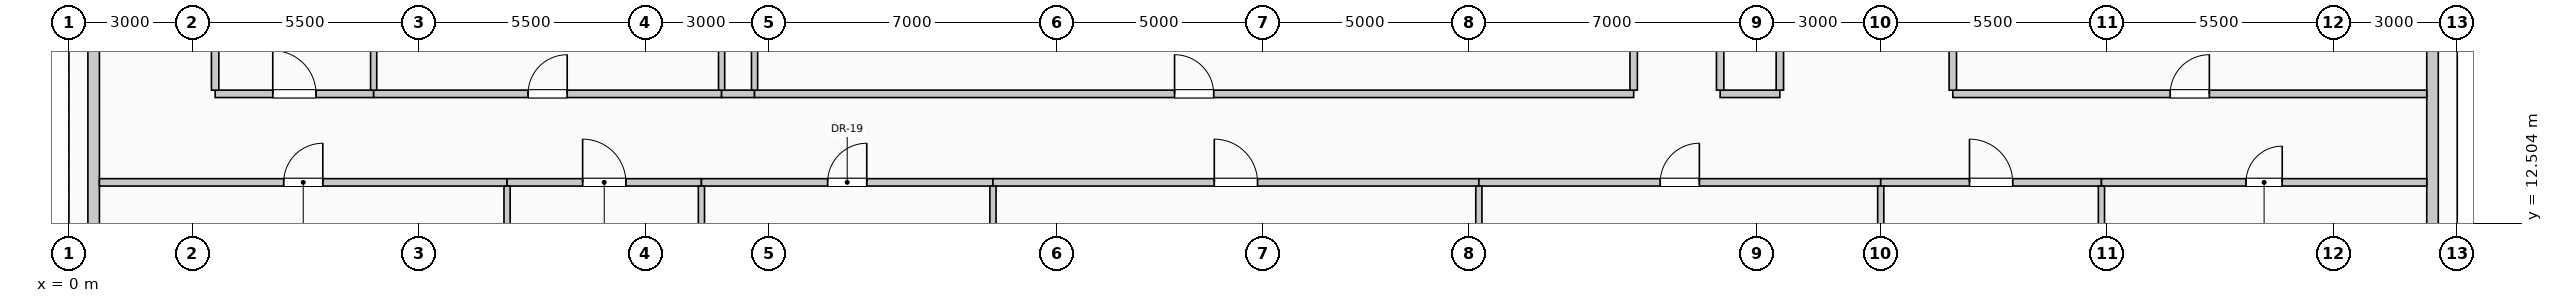
"""IFC4 building model, lengths in metres.
Left out: names, types, materials, properties, quantities, classifications, styles, units other than length and angle.
Written with IfcOpenShell. Run it as: python <this file> out.ifc"""

import sys

from ifc_helpers import new_model, si_unit, direction, frame, frame_2d, origin, place, context, subcontext, project, spatial, rectangle, extrude, element, fill, save


model = new_model("IFC4")
c1 = context("Model", 3, precision=1e-05, world=origin(), true_north=direction((0.0, 1.0)))
c2 = subcontext(c1, "Body", "Model", "MODEL_VIEW")
j1 = project(units=[si_unit("LENGTHUNIT", "METRE"), si_unit("PLANEANGLEUNIT", "RADIAN")], contexts=[c1])
p1 = place(None, origin())
s1 = spatial("IfcSite", under=j1, at=p1, CompositionType="ELEMENT")
p2 = place(p1, origin())
s2 = spatial("IfcBuilding", under=s1, at=p2, CompositionType="ELEMENT")
p3 = place(p2, frame((0.0, 0.0, 124.6)))
s3 = spatial("IfcBuildingStorey", under=s2, at=p3, CompositionType="ELEMENT", Elevation=124.6)
for number, where, z_axis, x_axis in (
    (1, (0.6, 10.445, 0.0), (0.0, 0.0, 1.0), (0.0, 1.0, 0.0)),
    (2, (57.4, 17.555, 0.0), (0.0, 0.0, 1.0), (0.0, -1.0, 0.0)),
):
    element("IfcWall", number, at=place(p3, frame(where, z_axis=z_axis, x_axis=x_axis)), inside=s3, PredefinedType="SOLIDWALL", context=c2, shape_type="SweptSolid", body=[
        extrude(rectangle(XDim=7.11, YDim=0.28, at=frame_2d((3.555, 0.0))), origin(), (0.0, 0.0, 1.0), 2.875),
    ])
p4 = place(p3, frame((0.74, 13.5, 0.0), z_axis=(0.0, 0.0, 1.0), x_axis=(1.0, 0.0, 0.0)))
e3 = element("IfcWall", 3, at=p4, inside=s3, PredefinedType="PARTITIONING", context=c2, shape_type="SweptSolid", body=[
    extrude(rectangle(XDim=9.9, YDim=0.18, at=frame_2d((4.95, 0.0))), origin(), (0.0, 0.0, 1.0), 3.725),
])
p5 = place(p4, frame((4.475, 0.0, 0.0)))
e4 = element("IfcOpeningElement", 4, at=p5, cuts=e3, PredefinedType="OPENING", context=c2, shape_type="SweptSolid", body=[
    extrude(rectangle(XDim=0.95, YDim=2.15, at=frame_2d((0.475, 1.075))), frame((0.0, 0.1, 0.0), z_axis=(0.0, -1.0, 0.0), x_axis=(1.0, 0.0, 0.0)), (0.0, 0.0, 1.0), 0.2),
])
p6 = place(p3, frame((10.64, 13.5, 0.0), z_axis=(0.0, 0.0, 1.0), x_axis=(1.0, 0.0, 0.0)))
e5 = element("IfcWall", 5, at=p6, inside=s3, PredefinedType="PARTITIONING", context=c2, shape_type="SweptSolid", body=[
    extrude(rectangle(XDim=4.72, YDim=0.18, at=frame_2d((2.36, 0.0))), origin(), (0.0, 0.0, 1.0), 3.725),
])
p7 = place(p6, frame((1.835, 0.0, 0.0)))
e6 = element("IfcOpeningElement", 6, at=p7, cuts=e5, PredefinedType="OPENING", context=c2, shape_type="SweptSolid", body=[
    extrude(rectangle(XDim=1.05, YDim=2.15, at=frame_2d((0.525, 1.075))), frame((0.0, 0.1, 0.0), z_axis=(0.0, -1.0, 0.0), x_axis=(1.0, 0.0, 0.0)), (0.0, 0.0, 1.0), 0.2),
])
p8 = place(p3, frame((15.36, 13.5, 0.0), z_axis=(0.0, 0.0, 1.0), x_axis=(1.0, 0.0, 0.0)))
e7 = element("IfcWall", 7, at=p8, inside=s3, PredefinedType="PARTITIONING", context=c2, shape_type="SweptSolid", body=[
    extrude(rectangle(XDim=7.08, YDim=0.18, at=frame_2d((3.54, 0.0))), origin(), (0.0, 0.0, 1.0), 3.725),
])
p9 = place(p8, frame((3.065, 0.0, 0.0)))
e8 = element("IfcOpeningElement", 8, at=p9, cuts=e7, PredefinedType="OPENING", context=c2, shape_type="SweptSolid", body=[
    extrude(rectangle(XDim=0.95, YDim=2.15, at=frame_2d((0.475, 1.075))), frame((0.0, 0.1, 0.0), z_axis=(0.0, -1.0, 0.0), x_axis=(1.0, 0.0, 0.0)), (0.0, 0.0, 1.0), 0.2),
])
p10 = place(p3, frame((22.44, 13.5, 0.0), z_axis=(0.0, 0.0, 1.0), x_axis=(1.0, 0.0, 0.0)))
e9 = element("IfcWall", 9, at=p10, inside=s3, PredefinedType="PARTITIONING", context=c2, shape_type="SweptSolid", body=[
    extrude(rectangle(XDim=11.8, YDim=0.18, at=frame_2d((5.9, 0.0))), origin(), (0.0, 0.0, 1.0), 3.725),
])
p11 = place(p10, frame((5.375, 0.0, 0.0)))
e10 = element("IfcOpeningElement", 10, at=p11, cuts=e9, PredefinedType="OPENING", context=c2, shape_type="SweptSolid", body=[
    extrude(rectangle(XDim=1.05, YDim=2.15, at=frame_2d((0.525, 1.075))), frame((0.0, 0.1, 0.0), z_axis=(0.0, -1.0, 0.0), x_axis=(1.0, 0.0, 0.0)), (0.0, 0.0, 1.0), 0.2),
])
p12 = place(p3, frame((34.24, 13.5, 0.0), z_axis=(0.0, 0.0, 1.0), x_axis=(1.0, 0.0, 0.0)))
e11 = element("IfcWall", 11, at=p12, inside=s3, PredefinedType="PARTITIONING", context=c2, shape_type="SweptSolid", body=[
    extrude(rectangle(XDim=9.76, YDim=0.18, at=frame_2d((4.88, 0.0))), origin(), (0.0, 0.0, 1.0), 3.725),
])
p13 = place(p12, frame((4.405, 0.0, 0.0)))
e12 = element("IfcOpeningElement", 12, at=p13, cuts=e11, PredefinedType="OPENING", context=c2, shape_type="SweptSolid", body=[
    extrude(rectangle(XDim=0.95, YDim=2.15, at=frame_2d((0.475, 1.075))), frame((0.0, 0.1, 0.0), z_axis=(0.0, -1.0, 0.0), x_axis=(1.0, 0.0, 0.0)), (0.0, 0.0, 1.0), 0.2),
])
p14 = place(p3, frame((44.0, 13.5, 0.0), z_axis=(0.0, 0.0, 1.0), x_axis=(1.0, 0.0, 0.0)))
e13 = element("IfcWall", 13, at=p14, inside=s3, PredefinedType="PARTITIONING", context=c2, shape_type="SweptSolid", body=[
    extrude(rectangle(XDim=5.36, YDim=0.18, at=frame_2d((2.68, 0.0))), origin(), (0.0, 0.0, 1.0), 3.725),
])
p15 = place(p14, frame((2.155, 0.0, 0.0)))
e14 = element("IfcOpeningElement", 14, at=p15, cuts=e13, PredefinedType="OPENING", context=c2, shape_type="SweptSolid", body=[
    extrude(rectangle(XDim=1.05, YDim=2.15, at=frame_2d((0.525, 1.075))), frame((0.0, 0.1, 0.0), z_axis=(0.0, -1.0, 0.0), x_axis=(1.0, 0.0, 0.0)), (0.0, 0.0, 1.0), 0.2),
])
p16 = place(p3, frame((49.36, 13.5, 0.0), z_axis=(0.0, 0.0, 1.0), x_axis=(1.0, 0.0, 0.0)))
e15 = element("IfcWall", 15, at=p16, inside=s3, PredefinedType="PARTITIONING", context=c2, shape_type="SweptSolid", body=[
    extrude(rectangle(XDim=7.9, YDim=0.18, at=frame_2d((3.95, 0.0))), origin(), (0.0, 0.0, 1.0), 3.725),
])
p17 = place(p16, frame((3.51, 0.0, 0.0)))
e16 = element("IfcOpeningElement", 16, at=p17, cuts=e15, PredefinedType="OPENING", context=c2, shape_type="SweptSolid", body=[
    extrude(rectangle(XDim=0.88, YDim=2.1, at=frame_2d((0.44, 1.05))), frame((0.0, 0.1, 0.0), z_axis=(0.0, -1.0, 0.0), x_axis=(1.0, 0.0, 0.0)), (0.0, 0.0, 1.0), 0.2),
])
p18 = place(p3, frame((3.55, 15.65, 0.0), z_axis=(0.0, 0.0, 1.0), x_axis=(1.0, 0.0, 0.0)))
e17 = element("IfcWall", 17, at=p18, inside=s3, PredefinedType="PARTITIONING", context=c2, shape_type="SweptSolid", body=[
    extrude(rectangle(XDim=3.85, YDim=0.18, at=frame_2d((1.925, 0.0))), origin(), (0.0, 0.0, 1.0), 3.725),
])
p19 = place(p18, frame((1.4, 0.0, 0.0)))
e18 = element("IfcOpeningElement", 18, at=p19, cuts=e17, PredefinedType="OPENING", context=c2, shape_type="SweptSolid", body=[
    extrude(rectangle(XDim=1.05, YDim=2.15, at=frame_2d((0.525, 1.075))), frame((0.0, 0.1, 0.0), z_axis=(0.0, -1.0, 0.0), x_axis=(1.0, 0.0, 0.0)), (0.0, 0.0, 1.0), 0.2),
])
p20 = place(p3, frame((7.4, 15.65, 0.0), z_axis=(0.0, 0.0, 1.0), x_axis=(1.0, 0.0, 0.0)))
e19 = element("IfcWall", 19, at=p20, inside=s3, PredefinedType="PARTITIONING", context=c2, shape_type="SweptSolid", body=[
    extrude(rectangle(XDim=8.45, YDim=0.18, at=frame_2d((4.225, 0.0))), origin(), (0.0, 0.0, 1.0), 3.725),
])
p21 = place(p20, frame((3.75, 0.0, 0.0)))
e20 = element("IfcOpeningElement", 20, at=p21, cuts=e19, PredefinedType="OPENING", context=c2, shape_type="SweptSolid", body=[
    extrude(rectangle(XDim=0.95, YDim=2.15, at=frame_2d((0.475, 1.075))), frame((0.0, 0.1, 0.0), z_axis=(0.0, -1.0, 0.0), x_axis=(1.0, 0.0, 0.0)), (0.0, 0.0, 1.0), 0.2),
])
p22 = place(p3, frame((15.85, 15.65, 0.0), z_axis=(0.0, 0.0, 1.0), x_axis=(1.0, 0.0, 0.0)))
e21 = element("IfcWall", 21, at=p22, inside=s3, PredefinedType="PARTITIONING", context=c2, shape_type="SweptSolid", body=[
    extrude(rectangle(XDim=0.8, YDim=0.18, at=frame_2d((0.4, 0.0))), origin(), (0.0, 0.0, 1.0), 3.725),
])
p23 = place(p3, frame((16.65, 15.65, 0.0), z_axis=(0.0, 0.0, 1.0), x_axis=(1.0, 0.0, 0.0)))
e22 = element("IfcWall", 22, at=p23, inside=s3, PredefinedType="PARTITIONING", context=c2, shape_type="SweptSolid", body=[
    extrude(rectangle(XDim=21.35, YDim=0.18, at=frame_2d((10.675, 0.0))), origin(), (0.0, 0.0, 1.0), 3.725),
])
p24 = place(p23, frame((10.2, 0.0, 0.0)))
e23 = element("IfcOpeningElement", 23, at=p24, cuts=e22, PredefinedType="OPENING", context=c2, shape_type="SweptSolid", body=[
    extrude(rectangle(XDim=0.95, YDim=2.15, at=frame_2d((0.475, 1.075))), frame((0.0, 0.1, 0.0), z_axis=(0.0, -1.0, 0.0), x_axis=(1.0, 0.0, 0.0)), (0.0, 0.0, 1.0), 0.2),
])
p25 = place(p3, frame((40.1, 15.65, 0.0), z_axis=(0.0, 0.0, 1.0), x_axis=(1.0, 0.0, 0.0)))
e24 = element("IfcWall", 24, at=p25, inside=s3, PredefinedType="PARTITIONING", context=c2, shape_type="SweptSolid", body=[
    extrude(rectangle(XDim=1.45, YDim=0.18, at=frame_2d((0.725, 0.0))), origin(), (0.0, 0.0, 1.0), 3.725),
])
p26 = place(p3, frame((45.75, 15.65, 0.0), z_axis=(0.0, 0.0, 1.0), x_axis=(1.0, 0.0, 0.0)))
e25 = element("IfcWall", 25, at=p26, inside=s3, PredefinedType="PARTITIONING", context=c2, shape_type="SweptSolid", body=[
    extrude(rectangle(XDim=11.51, YDim=0.18, at=frame_2d((5.755, 0.0))), origin(), (0.0, 0.0, 1.0), 3.725),
])
p27 = place(p26, frame((5.28, 0.0, 0.0)))
e26 = element("IfcOpeningElement", 26, at=p27, cuts=e25, PredefinedType="OPENING", context=c2, shape_type="SweptSolid", body=[
    extrude(rectangle(XDim=0.95, YDim=2.15, at=frame_2d((0.475, 1.075))), frame((0.0, 0.1, 0.0), z_axis=(0.0, -1.0, 0.0), x_axis=(1.0, 0.0, 0.0)), (0.0, 0.0, 1.0), 0.2),
])
p28 = place(p3, frame((3.55, 15.74, 0.0), z_axis=(0.0, 0.0, 1.0), x_axis=(0.0, 1.0, 0.0)))
e27 = element("IfcWall", 27, at=p28, inside=s3, PredefinedType="PARTITIONING", context=c2, shape_type="SweptSolid", body=[
    extrude(rectangle(XDim=3.135, YDim=0.18, at=frame_2d((1.567, 0.0))), origin(), (0.0, 0.0, 1.0), 3.725),
])
p29 = place(p3, frame((7.4, 15.74, 0.0), z_axis=(0.0, 0.0, 1.0), x_axis=(0.0, 1.0, 0.0)))
e28 = element("IfcWall", 28, at=p29, inside=s3, PredefinedType="PARTITIONING", context=c2, shape_type="SweptSolid", body=[
    extrude(rectangle(XDim=3.135, YDim=0.15, at=frame_2d((1.567, 0.0))), origin(), (0.0, 0.0, 1.0), 3.725),
])
for number, where, z_axis, x_axis in (
    (29, (10.64, 0.74, 0.0), (0.0, 0.0, 1.0), (0.0, 1.0, 0.0)),
    (30, (15.36, 0.74, 0.0), (0.0, 0.0, 1.0), (0.0, 1.0, 0.0)),
):
    element("IfcWall", number, at=place(p3, frame(where, z_axis=z_axis, x_axis=x_axis)), inside=s3, PredefinedType="PARTITIONING", context=c2, shape_type="SweptSolid", body=[
        extrude(rectangle(XDim=12.67, YDim=0.15, at=frame_2d((6.335, 0.0))), origin(), (0.0, 0.0, 1.0), 3.725),
    ])
p30 = place(p3, frame((15.85, 15.74, 0.0), z_axis=(0.0, 0.0, 1.0), x_axis=(0.0, 1.0, 0.0)))
e31 = element("IfcWall", 31, at=p30, inside=s3, PredefinedType="PARTITIONING", context=c2, shape_type="SweptSolid", body=[
    extrude(rectangle(XDim=1.76, YDim=0.15, at=frame_2d((0.88, 0.0))), origin(), (0.0, 0.0, 1.0), 3.725),
])
p31 = place(p3, frame((16.65, 15.74, 0.0), z_axis=(0.0, 0.0, 1.0), x_axis=(0.0, 1.0, 0.0)))
e32 = element("IfcWall", 32, at=p31, inside=s3, PredefinedType="PARTITIONING", context=c2, shape_type="SweptSolid", body=[
    extrude(rectangle(XDim=1.76, YDim=0.15, at=frame_2d((0.88, 0.0))), origin(), (0.0, 0.0, 1.0), 3.07),
])
p32 = place(p3, frame((22.44, 0.74, 0.0), z_axis=(0.0, 0.0, 1.0), x_axis=(0.0, 1.0, 0.0)))
e33 = element("IfcWall", 33, at=p32, inside=s3, PredefinedType="PARTITIONING", context=c2, shape_type="SweptSolid", body=[
    extrude(rectangle(XDim=12.67, YDim=0.15, at=frame_2d((6.335, 0.0))), origin(), (0.0, 0.0, 1.0), 3.725),
])
p33 = place(p3, frame((34.24, 1.3, 0.0), z_axis=(0.0, 0.0, 1.0), x_axis=(0.0, 1.0, 0.0)))
e34 = element("IfcWall", 34, at=p33, inside=s3, PredefinedType="PARTITIONING", context=c2, shape_type="SweptSolid", body=[
    extrude(rectangle(XDim=12.11, YDim=0.15, at=frame_2d((6.055, 0.0))), origin(), (0.0, 0.0, 1.0), 3.725),
])
p34 = place(p3, frame((38.0, 15.74, 0.0), z_axis=(0.0, 0.0, 1.0), x_axis=(0.0, 1.0, 0.0)))
e35 = element("IfcWall", 35, at=p34, inside=s3, PredefinedType="PARTITIONING", context=c2, shape_type="SweptSolid", body=[
    extrude(rectangle(XDim=10.785, YDim=0.18, at=frame_2d((5.393, 0.0))), origin(), (0.0, 0.0, 1.0), 3.725),
])
p35 = place(p3, frame((40.1, 15.74, 0.0), z_axis=(0.0, 0.0, 1.0), x_axis=(0.0, 1.0, 0.0)))
e36 = element("IfcWall", 36, at=p35, inside=s3, PredefinedType="PARTITIONING", context=c2, shape_type="SweptSolid", body=[
    extrude(rectangle(XDim=12.77, YDim=0.18, at=frame_2d((6.385, 0.0))), origin(), (0.0, 0.0, 1.0), 3.725),
])
p36 = place(p3, frame((41.55, 15.74, 0.0), z_axis=(0.0, 0.0, 1.0), x_axis=(0.0, 1.0, 0.0)))
e37 = element("IfcWall", 37, at=p36, inside=s3, PredefinedType="PARTITIONING", context=c2, shape_type="SweptSolid", body=[
    extrude(rectangle(XDim=1.76, YDim=0.18, at=frame_2d((0.88, 0.0))), origin(), (0.0, 0.0, 1.0), 3.07),
])
p37 = place(p3, frame((44.0, 1.175, 0.0), z_axis=(0.0, 0.0, 1.0), x_axis=(0.0, 1.0, 0.0)))
e38 = element("IfcWall", 38, at=p37, inside=s3, PredefinedType="PARTITIONING", context=c2, shape_type="SweptSolid", body=[
    extrude(rectangle(XDim=12.235, YDim=0.15, at=frame_2d((6.117, 0.0))), origin(), (0.0, 0.0, 1.0), 3.725),
])
p38 = place(p3, frame((45.75, 15.74, 0.0), z_axis=(0.0, 0.0, 1.0), x_axis=(0.0, 1.0, 0.0)))
e39 = element("IfcWall", 39, at=p38, inside=s3, PredefinedType="PARTITIONING", context=c2, shape_type="SweptSolid", body=[
    extrude(rectangle(XDim=8.185, YDim=0.18, at=frame_2d((4.093, 0.0))), origin(), (0.0, 0.0, 1.0), 3.725),
])
p39 = place(p3, frame((49.36, 1.175, 0.0), z_axis=(0.0, 0.0, 1.0), x_axis=(0.0, 1.0, 0.0)))
e40 = element("IfcWall", 40, at=p39, inside=s3, PredefinedType="PARTITIONING", context=c2, shape_type="SweptSolid", body=[
    extrude(rectangle(XDim=12.235, YDim=0.15, at=frame_2d((6.117, 0.0))), origin(), (0.0, 0.0, 1.0), 3.725),
])
p40 = place(p5, origin())
e41 = element("IfcDoor", 41, at=p40, inside=s3, OperationType="SINGLE_SWING_RIGHT", PredefinedType="DOOR", context=c2, shape_type="SweptSolid", body=[
    extrude(rectangle(XDim=0.95, YDim=2.15, at=frame_2d((0.475, 1.075))), frame((0.0, 0.025, 0.0), z_axis=(0.0, -1.0, 0.0), x_axis=(1.0, 0.0, 0.0)), (0.0, 0.0, 1.0), 0.05),
])
fill(e4, e41)
p41 = place(p7, origin())
e42 = element("IfcDoor", 42, at=p41, inside=s3, OperationType="SINGLE_SWING_LEFT", PredefinedType="DOOR", context=c2, shape_type="SweptSolid", body=[
    extrude(rectangle(XDim=1.05, YDim=2.15, at=frame_2d((0.525, 1.075))), frame((0.0, 0.025, 0.0), z_axis=(0.0, -1.0, 0.0), x_axis=(1.0, 0.0, 0.0)), (0.0, 0.0, 1.0), 0.05),
])
fill(e6, e42)
p42 = place(p9, origin())
e43 = element("IfcDoor", 43, at=p42, inside=s3, OperationType="SINGLE_SWING_RIGHT", PredefinedType="DOOR", context=c2, shape_type="SweptSolid", body=[
    extrude(rectangle(XDim=0.95, YDim=2.15, at=frame_2d((0.475, 1.075))), frame((0.0, 0.025, 0.0), z_axis=(0.0, -1.0, 0.0), x_axis=(1.0, 0.0, 0.0)), (0.0, 0.0, 1.0), 0.05),
])
fill(e8, e43)
p43 = place(p11, origin())
e44 = element("IfcDoor", 44, at=p43, inside=s3, OperationType="SINGLE_SWING_LEFT", PredefinedType="DOOR", context=c2, shape_type="SweptSolid", body=[
    extrude(rectangle(XDim=1.05, YDim=2.15, at=frame_2d((0.525, 1.075))), frame((0.0, 0.025, 0.0), z_axis=(0.0, -1.0, 0.0), x_axis=(1.0, 0.0, 0.0)), (0.0, 0.0, 1.0), 0.05),
])
fill(e10, e44)
p44 = place(p13, origin())
e45 = element("IfcDoor", 45, at=p44, inside=s3, OperationType="SINGLE_SWING_RIGHT", PredefinedType="DOOR", context=c2, shape_type="SweptSolid", body=[
    extrude(rectangle(XDim=0.95, YDim=2.15, at=frame_2d((0.475, 1.075))), frame((0.0, 0.025, 0.0), z_axis=(0.0, -1.0, 0.0), x_axis=(1.0, 0.0, 0.0)), (0.0, 0.0, 1.0), 0.05),
])
fill(e12, e45)
p45 = place(p15, origin())
e46 = element("IfcDoor", 46, at=p45, inside=s3, OperationType="SINGLE_SWING_LEFT", PredefinedType="DOOR", context=c2, shape_type="SweptSolid", body=[
    extrude(rectangle(XDim=1.05, YDim=2.15, at=frame_2d((0.525, 1.075))), frame((0.0, 0.025, 0.0), z_axis=(0.0, -1.0, 0.0), x_axis=(1.0, 0.0, 0.0)), (0.0, 0.0, 1.0), 0.05),
])
fill(e14, e46)
p46 = place(p17, origin())
e47 = element("IfcDoor", 47, at=p46, inside=s3, OperationType="SINGLE_SWING_RIGHT", PredefinedType="DOOR", context=c2, shape_type="SweptSolid", body=[
    extrude(rectangle(XDim=0.88, YDim=2.1, at=frame_2d((0.44, 1.05))), frame((0.0, 0.025, 0.0), z_axis=(0.0, -1.0, 0.0), x_axis=(1.0, 0.0, 0.0)), (0.0, 0.0, 1.0), 0.05),
])
fill(e16, e47)
p47 = place(p19, origin())
e48 = element("IfcDoor", 48, at=p47, inside=s3, OperationType="SINGLE_SWING_LEFT", PredefinedType="DOOR", context=c2, shape_type="SweptSolid", body=[
    extrude(rectangle(XDim=1.05, YDim=2.15, at=frame_2d((0.525, 1.075))), frame((0.0, 0.025, 0.0), z_axis=(0.0, -1.0, 0.0), x_axis=(1.0, 0.0, 0.0)), (0.0, 0.0, 1.0), 0.05),
])
fill(e18, e48)
p48 = place(p21, origin())
e49 = element("IfcDoor", 49, at=p48, inside=s3, OperationType="SINGLE_SWING_RIGHT", PredefinedType="DOOR", context=c2, shape_type="SweptSolid", body=[
    extrude(rectangle(XDim=0.95, YDim=2.15, at=frame_2d((0.475, 1.075))), frame((0.0, 0.025, 0.0), z_axis=(0.0, -1.0, 0.0), x_axis=(1.0, 0.0, 0.0)), (0.0, 0.0, 1.0), 0.05),
])
fill(e20, e49)
p49 = place(p24, origin())
e50 = element("IfcDoor", 50, at=p49, inside=s3, OperationType="SINGLE_SWING_LEFT", PredefinedType="DOOR", context=c2, shape_type="SweptSolid", body=[
    extrude(rectangle(XDim=0.95, YDim=2.15, at=frame_2d((0.475, 1.075))), frame((0.0, 0.025, 0.0), z_axis=(0.0, -1.0, 0.0), x_axis=(1.0, 0.0, 0.0)), (0.0, 0.0, 1.0), 0.05),
])
fill(e23, e50)
p50 = place(p27, origin())
e51 = element("IfcDoor", 51, at=p50, inside=s3, OperationType="SINGLE_SWING_RIGHT", PredefinedType="DOOR", context=c2, shape_type="SweptSolid", body=[
    extrude(rectangle(XDim=0.95, YDim=2.15, at=frame_2d((0.475, 1.075))), frame((0.0, 0.025, 0.0), z_axis=(0.0, -1.0, 0.0), x_axis=(1.0, 0.0, 0.0)), (0.0, 0.0, 1.0), 0.05),
])
fill(e26, e51)
save(model, sys.argv[1])
